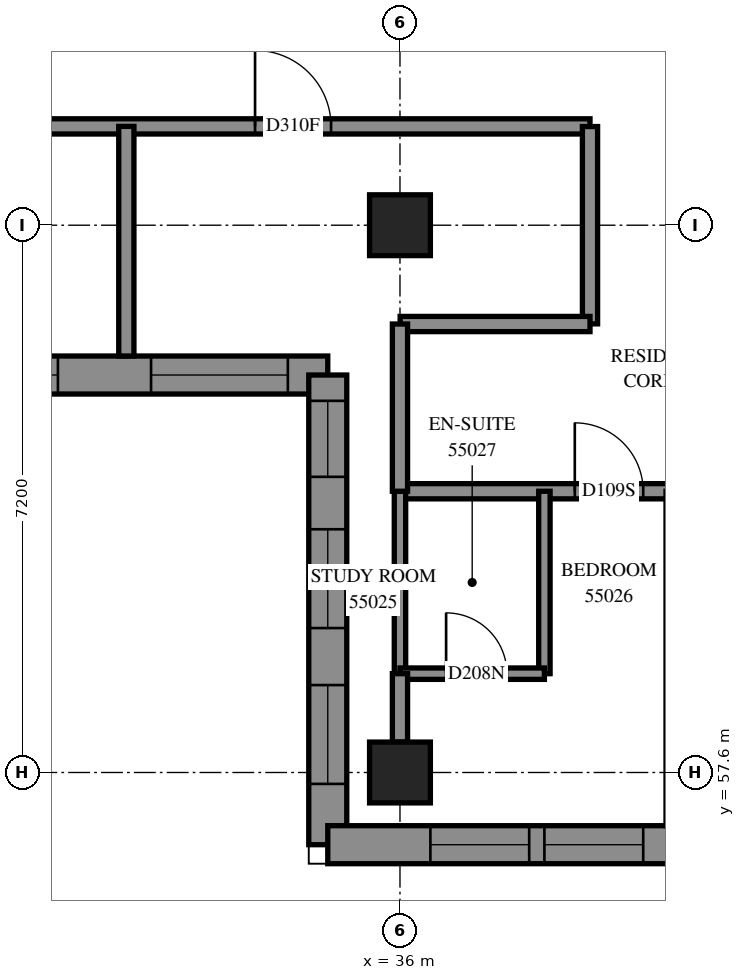
"""IFC4 building model, lengths in metres.
Left out: names, types, materials, properties, quantities, classifications, styles, units other than length and angle.
Written with IfcOpenShell. Run it as: python <this file> out.ifc"""

import sys

from ifc_helpers import new_model, si_unit, direction, frame, frame_2d, origin, origin_2d, place, context, subcontext, project, spatial, polyline, rectangle, outline, extrude, element, fill, save


model = new_model("IFC4")
c1 = context("Model", 3, precision=1e-05, world=origin(), true_north=direction((0.0, 1.0)))
c2 = subcontext(c1, "Body", "Model", "MODEL_VIEW")
j1 = project(units=[si_unit("LENGTHUNIT", "METRE"), si_unit("PLANEANGLEUNIT", "RADIAN")], contexts=[c1])
p1 = place(None, origin())
s1 = spatial("IfcSite", under=j1, at=p1, CompositionType="ELEMENT")
p2 = place(p1, origin())
s2 = spatial("IfcBuilding", under=s1, at=p2, CompositionType="ELEMENT")
p3 = place(p2, frame((0.0, 0.0, 203.2)))
s3 = spatial("IfcBuildingStorey", under=s2, at=p3, CompositionType="ELEMENT", Elevation=203.2)
for number, where, z_axis, x_axis in (
    (1, (36.0, 57.6, 0.0), (0.0, 0.0, 1.0), (1.0, 0.0, 0.0)),
    (2, (36.0, 64.8, 0.0), (0.0, 0.0, 1.0), (1.0, 0.0, 0.0)),
):
    element("IfcColumn", number, at=place(p3, frame(where, z_axis=z_axis, x_axis=x_axis)), inside=s3, PredefinedType="COLUMN", context=c2, shape_type="SweptSolid", body=[
        extrude(rectangle(XDim=0.8, YDim=0.8, at=origin_2d()), origin(), (0.0, 0.0, 1.0), 3.1),
    ])
p4 = place(p3, frame((19.629, 62.829, 0.0), z_axis=(0.0, 0.0, 1.0), x_axis=(1.0, 0.0, 0.0)))
e3 = element("IfcWall", 3, at=p4, inside=s3, PredefinedType="SOLIDWALL", context=c2, shape_type="SweptSolid", body=[
    extrude(outline(polyline([(-0.25, -0.25), (15.171, -0.25), (15.671, 0.25), (0.25, 0.25), (-0.25, -0.25)])), origin(), (0.0, 0.0, 1.0), 3.1),
])
p5 = place(p4, frame((2.671, 0.0, 0.7)))
e4 = element("IfcOpeningElement", 4, at=p5, cuts=e3, PredefinedType="OPENING", context=c2, shape_type="SweptSolid", body=[
    extrude(rectangle(XDim=1.8, YDim=1.8, at=frame_2d((0.9, 0.9))), frame((0.0, 0.26, 0.0), z_axis=(0.0, -1.0, 0.0), x_axis=(1.0, 0.0, 0.0)), (0.0, 0.0, 1.0), 0.52),
])
p6 = place(p4, frame((6.471, 0.0, 0.7)))
e5 = element("IfcOpeningElement", 5, at=p6, cuts=e3, PredefinedType="OPENING", context=c2, shape_type="SweptSolid", body=[
    extrude(rectangle(XDim=1.8, YDim=1.8, at=frame_2d((0.9, 0.9))), frame((0.0, 0.26, 0.0), z_axis=(0.0, -1.0, 0.0), x_axis=(1.0, 0.0, 0.0)), (0.0, 0.0, 1.0), 0.52),
])
p7 = place(p4, frame((10.071, 0.0, 0.7)))
e6 = element("IfcOpeningElement", 6, at=p7, cuts=e3, PredefinedType="OPENING", context=c2, shape_type="SweptSolid", body=[
    extrude(rectangle(XDim=1.8, YDim=1.8, at=frame_2d((0.9, 0.9))), frame((0.0, 0.26, 0.0), z_axis=(0.0, -1.0, 0.0), x_axis=(1.0, 0.0, 0.0)), (0.0, 0.0, 1.0), 0.52),
])
p8 = place(p4, frame((13.096, 0.0, 0.7)))
e7 = element("IfcOpeningElement", 7, at=p8, cuts=e3, PredefinedType="OPENING", context=c2, shape_type="SweptSolid", body=[
    extrude(rectangle(XDim=1.8, YDim=1.8, at=frame_2d((0.9, 0.9))), frame((0.0, 0.26, 0.0), z_axis=(0.0, -1.0, 0.0), x_axis=(1.0, 0.0, 0.0)), (0.0, 0.0, 1.0), 0.52),
])
p9 = place(p3, frame((35.05, 62.829, 0.0), z_axis=(0.0, 0.0, 1.0), x_axis=(0.0, -1.0, 0.0)))
e8 = element("IfcWall", 8, at=p9, inside=s3, PredefinedType="SOLIDWALL", context=c2, shape_type="SweptSolid", body=[
    extrude(outline(polyline([(0.25, -0.25), (6.429, -0.25), (5.929, 0.25), (-0.25, 0.25), (0.25, -0.25)])), origin(), (0.0, 0.0, 1.0), 3.1),
])
p10 = place(p9, frame((2.029, 0.0, 0.45)))
e9 = element("IfcOpeningElement", 9, at=p10, cuts=e8, PredefinedType="OPENING", context=c2, shape_type="SweptSolid", body=[
    extrude(rectangle(XDim=1.3, YDim=2.5, at=frame_2d((0.65, 1.25))), frame((0.0, 0.26, 0.0), z_axis=(0.0, -1.0, 0.0), x_axis=(1.0, 0.0, 0.0)), (0.0, 0.0, 1.0), 0.52),
])
p11 = place(p9, frame((4.079, 0.0, 0.45)))
e10 = element("IfcOpeningElement", 10, at=p11, cuts=e8, PredefinedType="OPENING", context=c2, shape_type="SweptSolid", body=[
    extrude(rectangle(XDim=1.3, YDim=2.5, at=frame_2d((0.65, 1.25))), frame((0.0, 0.26, 0.0), z_axis=(0.0, -1.0, 0.0), x_axis=(1.0, 0.0, 0.0)), (0.0, 0.0, 1.0), 0.52),
])
p12 = place(p9, frame((0.34, 0.0, 0.45)))
e11 = element("IfcOpeningElement", 11, at=p12, cuts=e8, PredefinedType="OPENING", context=c2, shape_type="SweptSolid", body=[
    extrude(rectangle(XDim=1.0, YDim=2.5, at=frame_2d((0.5, 1.25))), frame((0.0, 0.26, 0.0), z_axis=(0.0, -1.0, 0.0), x_axis=(1.0, 0.0, 0.0)), (0.0, 0.0, 1.0), 0.52),
])
p13 = place(p3, frame((35.05, 56.65, 0.0), z_axis=(0.0, 0.0, 1.0), x_axis=(1.0, 0.0, 0.0)))
e12 = element("IfcWall", 12, at=p13, inside=s3, PredefinedType="SOLIDWALL", context=c2, shape_type="SweptSolid", body=[
    extrude(outline(polyline([(-0.25, -0.25), (6.95, -0.25), (7.45, 0.25), (0.25, 0.25), (-0.25, -0.25)])), origin(), (0.0, 0.0, 1.0), 3.1),
])
p14 = place(p13, frame((1.35, 0.0, 0.45)))
e13 = element("IfcOpeningElement", 13, at=p14, cuts=e12, PredefinedType="OPENING", context=c2, shape_type="SweptSolid", body=[
    extrude(rectangle(XDim=1.3, YDim=2.5, at=frame_2d((0.65, 1.25))), frame((0.0, 0.26, 0.0), z_axis=(0.0, -1.0, 0.0), x_axis=(1.0, 0.0, 0.0)), (0.0, 0.0, 1.0), 0.52),
])
p15 = place(p13, frame((2.85, 0.0, 0.45)))
e14 = element("IfcOpeningElement", 14, at=p15, cuts=e12, PredefinedType="OPENING", context=c2, shape_type="SweptSolid", body=[
    extrude(rectangle(XDim=1.3, YDim=2.5, at=frame_2d((0.65, 1.25))), frame((0.0, 0.26, 0.0), z_axis=(0.0, -1.0, 0.0), x_axis=(1.0, 0.0, 0.0)), (0.0, 0.0, 1.0), 0.52),
])
p16 = place(p13, frame((5.175, 0.0, 0.45)))
e15 = element("IfcOpeningElement", 15, at=p16, cuts=e12, PredefinedType="OPENING", context=c2, shape_type="SweptSolid", body=[
    extrude(rectangle(XDim=1.2, YDim=2.5, at=frame_2d((0.6, 1.25))), frame((0.0, 0.26, 0.0), z_axis=(0.0, -1.0, 0.0), x_axis=(1.0, 0.0, 0.0)), (0.0, 0.0, 1.0), 0.52),
])
p17 = place(p3, frame((21.6, 66.1, 0.0), z_axis=(0.0, 0.0, 1.0), x_axis=(1.0, 0.0, 0.0)))
e16 = element("IfcWall", 16, at=p17, inside=s3, PredefinedType="PARTITIONING", context=c2, shape_type="SweptSolid", body=[
    extrude(rectangle(XDim=16.9, YDim=0.2, at=frame_2d((8.45, 0.0))), origin(), (0.0, 0.0, 1.0), 3.1),
])
p18 = place(p17, frame((12.493, 0.0, 0.0)))
e17 = element("IfcOpeningElement", 17, at=p18, cuts=e16, PredefinedType="OPENING", context=c2, shape_type="SweptSolid", body=[
    extrude(rectangle(XDim=1.0, YDim=2.1, at=frame_2d((0.5, 1.05))), frame((0.0, 0.11, 0.0), z_axis=(0.0, -1.0, 0.0), x_axis=(1.0, 0.0, 0.0)), (0.0, 0.0, 1.0), 0.22),
])
p19 = place(p3, frame((36.0, 61.3, 0.0), z_axis=(0.0, 0.0, 1.0), x_axis=(1.0, 0.0, 0.0)))
e18 = element("IfcWall", 18, at=p19, inside=s3, PredefinedType="PARTITIONING", context=c2, shape_type="SweptSolid", body=[
    extrude(rectangle(XDim=16.9, YDim=0.2, at=frame_2d((8.45, 0.0))), origin(), (0.0, 0.0, 1.0), 3.1),
])
p20 = place(p19, frame((2.3, 0.0, 0.0)))
e19 = element("IfcOpeningElement", 19, at=p20, cuts=e18, PredefinedType="OPENING", context=c2, shape_type="SweptSolid", body=[
    extrude(rectangle(XDim=0.9, YDim=2.1, at=frame_2d((0.45, 1.05))), frame((0.0, 0.11, 0.0), z_axis=(0.0, -1.0, 0.0), x_axis=(1.0, 0.0, 0.0)), (0.0, 0.0, 1.0), 0.22),
])
p21 = place(p19, frame((4.107, 0.0, 0.0)))
e20 = element("IfcOpeningElement", 20, at=p21, cuts=e18, PredefinedType="OPENING", context=c2, shape_type="SweptSolid", body=[
    extrude(rectangle(XDim=1.0, YDim=2.1, at=frame_2d((0.5, 1.05))), frame((0.0, 0.11, 0.0), z_axis=(0.0, -1.0, 0.0), x_axis=(1.0, 0.0, 0.0)), (0.0, 0.0, 1.0), 0.22),
])
p22 = place(p19, frame((9.5, 0.0, 0.0)))
e21 = element("IfcOpeningElement", 21, at=p22, cuts=e18, PredefinedType="OPENING", context=c2, shape_type="SweptSolid", body=[
    extrude(rectangle(XDim=0.9, YDim=2.1, at=frame_2d((0.45, 1.05))), frame((0.0, 0.11, 0.0), z_axis=(0.0, -1.0, 0.0), x_axis=(1.0, 0.0, 0.0)), (0.0, 0.0, 1.0), 0.22),
])
p23 = place(p19, frame((11.307, 0.0, 0.0)))
e22 = element("IfcOpeningElement", 22, at=p23, cuts=e18, PredefinedType="OPENING", context=c2, shape_type="SweptSolid", body=[
    extrude(rectangle(XDim=1.0, YDim=2.1, at=frame_2d((0.5, 1.05))), frame((0.0, 0.11, 0.0), z_axis=(0.0, -1.0, 0.0), x_axis=(1.0, 0.0, 0.0)), (0.0, 0.0, 1.0), 0.22),
])
p24 = place(p19, frame((15.647, 0.0, 0.0)))
e23 = element("IfcOpeningElement", 23, at=p24, cuts=e18, PredefinedType="OPENING", context=c2, shape_type="SweptSolid", body=[
    extrude(rectangle(XDim=1.0, YDim=2.1, at=frame_2d((0.5, 1.05))), frame((0.0, 0.11, 0.0), z_axis=(0.0, -1.0, 0.0), x_axis=(1.0, 0.0, 0.0)), (0.0, 0.0, 1.0), 0.22),
])
p25 = place(p3, frame((32.4, 63.079, 0.0), z_axis=(0.0, 0.0, 1.0), x_axis=(0.0, 1.0, 0.0)))
e24 = element("IfcWall", 24, at=p25, inside=s3, PredefinedType="PARTITIONING", context=c2, shape_type="SweptSolid", body=[
    extrude(rectangle(XDim=3.021, YDim=0.2, at=frame_2d((1.51, 0.0))), origin(), (0.0, 0.0, 1.0), 3.1),
])
p26 = place(p3, frame((38.5, 63.502, 0.0), z_axis=(0.0, 0.0, 1.0), x_axis=(0.0, 1.0, 0.0)))
e25 = element("IfcWall", 25, at=p26, inside=s3, PredefinedType="PARTITIONING", context=c2, shape_type="SweptSolid", body=[
    extrude(rectangle(XDim=2.596, YDim=0.2, at=frame_2d((1.298, 0.0))), origin(), (0.0, 0.0, 1.0), 3.1),
])
p27 = place(p3, frame((36.002, 63.5, 0.0), z_axis=(0.0, 0.0, 1.0), x_axis=(1.0, 0.0, 0.0)))
e26 = element("IfcWall", 26, at=p27, inside=s3, PredefinedType="PARTITIONING", context=c2, shape_type="SweptSolid", body=[
    extrude(rectangle(XDim=2.498, YDim=0.2, at=frame_2d((1.249, 0.0))), origin(), (0.0, 0.0, 1.0), 3.1),
])
p28 = place(p3, frame((37.9, 58.9, 0.0), z_axis=(0.0, 0.0, 1.0), x_axis=(0.0, 1.0, 0.0)))
e27 = element("IfcWall", 27, at=p28, inside=s3, PredefinedType="PARTITIONING", context=c2, shape_type="SweptSolid", body=[
    extrude(rectangle(XDim=2.4, YDim=0.15, at=frame_2d((1.2, 0.0))), origin(), (0.0, 0.0, 1.0), 3.1),
])
p29 = place(p3, frame((36.0, 58.9, 0.0), z_axis=(0.0, 0.0, 1.0), x_axis=(0.0, 1.0, 0.0)))
e28 = element("IfcWall", 28, at=p29, inside=s3, PredefinedType="PARTITIONING", context=c2, shape_type="SweptSolid", body=[
    extrude(rectangle(XDim=2.4, YDim=0.15, at=frame_2d((1.2, 0.0))), origin(), (0.0, 0.0, 1.0), 2.6),
])
p30 = place(p3, frame((36.0, 61.3, 0.0), z_axis=(0.0, 0.0, 1.0), x_axis=(0.0, 1.0, 0.0)))
e29 = element("IfcWall", 29, at=p30, inside=s3, PredefinedType="PARTITIONING", context=c2, shape_type="SweptSolid", body=[
    extrude(rectangle(XDim=2.2, YDim=0.2, at=frame_2d((1.1, 0.0))), origin(), (0.0, 0.0, 1.0), 2.6),
])
p31 = place(p3, frame((36.0, 58.9, 0.0), z_axis=(0.0, 0.0, 1.0), x_axis=(1.0, 0.0, 0.0)))
e30 = element("IfcWall", 30, at=p31, inside=s3, PredefinedType="PARTITIONING", context=c2, shape_type="SweptSolid", body=[
    extrude(rectangle(XDim=1.9, YDim=0.15, at=frame_2d((0.95, 0.0))), origin(), (0.0, 0.0, 1.0), 3.1),
])
p32 = place(p31, frame((0.607, 0.0, 0.0)))
e31 = element("IfcOpeningElement", 31, at=p32, cuts=e30, PredefinedType="OPENING", context=c2, shape_type="SweptSolid", body=[
    extrude(rectangle(XDim=0.8, YDim=2.1, at=frame_2d((0.4, 1.05))), frame((0.0, 0.085, 0.0), z_axis=(0.0, -1.0, 0.0), x_axis=(1.0, 0.0, 0.0)), (0.0, 0.0, 1.0), 0.17),
])
p33 = place(p3, frame((36.0, 58.0, 0.0), z_axis=(0.0, 0.0, 1.0), x_axis=(0.0, 1.0, 0.0)))
e32 = element("IfcWall", 32, at=p33, inside=s3, PredefinedType="PARTITIONING", context=c2, shape_type="SweptSolid", body=[
    extrude(rectangle(XDim=0.9, YDim=0.2, at=frame_2d((0.45, 0.0))), origin(), (0.0, 0.0, 1.0), 2.6),
])
p34 = place(p7, origin())
e33 = element("IfcWindow", 33, at=p34, inside=s3, PartitioningType="SINGLE_PANEL", PredefinedType="WINDOW", context=c2, shape_type="SweptSolid", body=[
    extrude(rectangle(XDim=1.8, YDim=1.8, at=frame_2d((0.9, 0.9))), frame((0.0, 0.18, 0.0), z_axis=(0.0, -1.0, 0.0), x_axis=(1.0, 0.0, 0.0)), (0.0, 0.0, 1.0), 0.06),
])
fill(e6, e33)
p35 = place(p8, origin())
e34 = element("IfcWindow", 34, at=p35, inside=s3, PartitioningType="SINGLE_PANEL", PredefinedType="WINDOW", context=c2, shape_type="SweptSolid", body=[
    extrude(rectangle(XDim=1.8, YDim=1.8, at=frame_2d((0.9, 0.9))), frame((0.0, 0.18, 0.0), z_axis=(0.0, -1.0, 0.0), x_axis=(1.0, 0.0, 0.0)), (0.0, 0.0, 1.0), 0.06),
])
fill(e7, e34)
p36 = place(p10, origin())
e35 = element("IfcWindow", 35, at=p36, inside=s3, PartitioningType="SINGLE_PANEL", PredefinedType="WINDOW", context=c2, shape_type="SweptSolid", body=[
    extrude(rectangle(XDim=1.3, YDim=2.5, at=frame_2d((0.65, 1.25))), frame((0.0, 0.18, 0.0), z_axis=(0.0, -1.0, 0.0), x_axis=(1.0, 0.0, 0.0)), (0.0, 0.0, 1.0), 0.06),
])
fill(e9, e35)
p37 = place(p11, origin())
e36 = element("IfcWindow", 36, at=p37, inside=s3, PartitioningType="SINGLE_PANEL", PredefinedType="WINDOW", context=c2, shape_type="SweptSolid", body=[
    extrude(rectangle(XDim=1.3, YDim=2.5, at=frame_2d((0.65, 1.25))), frame((0.0, 0.18, 0.0), z_axis=(0.0, -1.0, 0.0), x_axis=(1.0, 0.0, 0.0)), (0.0, 0.0, 1.0), 0.06),
])
fill(e10, e36)
p38 = place(p14, origin())
e37 = element("IfcWindow", 37, at=p38, inside=s3, PartitioningType="SINGLE_PANEL", PredefinedType="WINDOW", context=c2, shape_type="SweptSolid", body=[
    extrude(rectangle(XDim=1.3, YDim=2.5, at=frame_2d((0.65, 1.25))), frame((0.0, 0.18, 0.0), z_axis=(0.0, -1.0, 0.0), x_axis=(1.0, 0.0, 0.0)), (0.0, 0.0, 1.0), 0.06),
])
fill(e13, e37)
p39 = place(p15, origin())
e38 = element("IfcWindow", 38, at=p39, inside=s3, PartitioningType="SINGLE_PANEL", PredefinedType="WINDOW", context=c2, shape_type="SweptSolid", body=[
    extrude(rectangle(XDim=1.3, YDim=2.5, at=frame_2d((0.65, 1.25))), frame((0.0, 0.18, 0.0), z_axis=(0.0, -1.0, 0.0), x_axis=(1.0, 0.0, 0.0)), (0.0, 0.0, 1.0), 0.06),
])
fill(e14, e38)
p40 = place(p18, origin())
e39 = element("IfcDoor", 39, at=p40, inside=s3, OperationType="SINGLE_SWING_RIGHT", PredefinedType="DOOR", context=c2, shape_type="SweptSolid", body=[
    extrude(rectangle(XDim=1.0, YDim=2.1, at=frame_2d((0.5, 1.05))), frame((0.0, 0.025, 0.0), z_axis=(0.0, -1.0, 0.0), x_axis=(1.0, 0.0, 0.0)), (0.0, 0.0, 1.0), 0.05),
])
fill(e17, e39)
p41 = place(p20, origin())
e40 = element("IfcDoor", 40, at=p41, inside=s3, OperationType="SINGLE_SWING_LEFT", PredefinedType="DOOR", context=c2, shape_type="SweptSolid", body=[
    extrude(rectangle(XDim=0.9, YDim=2.1, at=frame_2d((0.45, 1.05))), frame((0.0, 0.025, 0.0), z_axis=(0.0, -1.0, 0.0), x_axis=(1.0, 0.0, 0.0)), (0.0, 0.0, 1.0), 0.05),
])
fill(e19, e40)
p42 = place(p32, origin())
e41 = element("IfcDoor", 41, at=p42, inside=s3, OperationType="SINGLE_SWING_RIGHT", PredefinedType="DOOR", context=c2, shape_type="SweptSolid", body=[
    extrude(rectangle(XDim=0.8, YDim=2.1, at=frame_2d((0.4, 1.05))), frame((0.0, 0.025, 0.0), z_axis=(0.0, -1.0, 0.0), x_axis=(1.0, 0.0, 0.0)), (0.0, 0.0, 1.0), 0.05),
])
fill(e31, e41)
p43 = place(p12, origin())
e42 = element("IfcWindow", 42, at=p43, inside=s3, PartitioningType="SINGLE_PANEL", PredefinedType="WINDOW", context=c2, shape_type="SweptSolid", body=[
    extrude(rectangle(XDim=1.0, YDim=2.5, at=frame_2d((0.5, 1.25))), frame((0.0, 0.18, 0.0), z_axis=(0.0, -1.0, 0.0), x_axis=(1.0, 0.0, 0.0)), (0.0, 0.0, 1.0), 0.06),
])
fill(e11, e42)
save(model, sys.argv[1])
